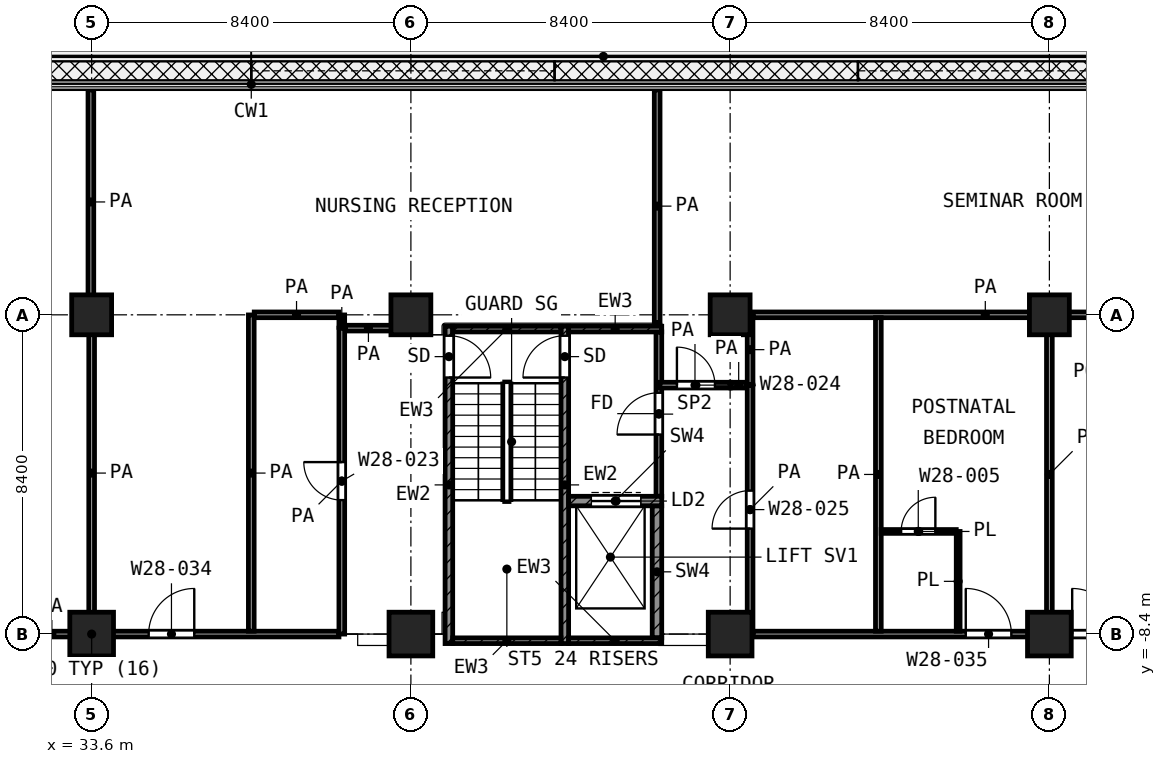
"""IFC4 building model, lengths in metres.
Left out: names, types, materials, properties, quantities, classifications, styles, units other than length and angle.
Written with IfcOpenShell. Run it as: python <this file> out.ifc"""

import sys

from ifc_helpers import new_model, si_unit, direction, frame, frame_2d, origin, origin_2d, place, context, subcontext, project, spatial, rectangle, extrude, element, fill, save


model = new_model("IFC4")
c1 = context("Model", 3, precision=1e-05, world=origin(), true_north=direction((0.0, 1.0)))
c2 = subcontext(c1, "Body", "Model", "MODEL_VIEW")
j1 = project(units=[si_unit("LENGTHUNIT", "METRE"), si_unit("PLANEANGLEUNIT", "RADIAN")], contexts=[c1])
p1 = place(None, origin())
s1 = spatial("IfcSite", under=j1, at=p1, CompositionType="ELEMENT")
p2 = place(p1, origin())
s2 = spatial("IfcBuilding", under=s1, at=p2, CompositionType="ELEMENT")
p3 = place(p2, frame((0.0, 0.0, 145.0)))
s3 = spatial("IfcBuildingStorey", under=s2, at=p3, CompositionType="ELEMENT", Elevation=145.0)
for number, where, z_axis, x_axis in (
    (1, (33.6, 0.0, 0.0), (0.0, 0.0, 1.0), (1.0, 0.0, 0.0)),
    (2, (42.0, 0.0, 0.0), (0.0, 0.0, 1.0), (1.0, 0.0, 0.0)),
    (3, (50.4, 0.0, 0.0), (0.0, 0.0, 1.0), (1.0, 0.0, 0.0)),
    (4, (58.8, 0.0, 0.0), (0.0, 0.0, 1.0), (1.0, 0.0, 0.0)),
):
    element("IfcColumn", number, at=place(p3, frame(where, z_axis=z_axis, x_axis=x_axis)), inside=s3, PredefinedType="COLUMN", context=c2, shape_type="SweptSolid", body=[
        extrude(rectangle(XDim=1.05, YDim=1.05, at=origin_2d()), origin(), (0.0, 0.0, 1.0), 4.2),
    ])
for number, where, z_axis, x_axis in (
    (5, (33.6, -8.4, 0.0), (0.0, 0.0, 1.0), (1.0, 0.0, 0.0)),
    (6, (42.0, -8.4, 0.0), (0.0, 0.0, 1.0), (1.0, 0.0, 0.0)),
    (7, (50.4, -8.4, 0.0), (0.0, 0.0, 1.0), (1.0, 0.0, 0.0)),
    (8, (58.8, -8.4, 0.0), (0.0, 0.0, 1.0), (1.0, 0.0, 0.0)),
):
    element("IfcColumn", number, at=place(p3, frame(where, z_axis=z_axis, x_axis=x_axis)), inside=s3, PredefinedType="COLUMN", context=c2, shape_type="SweptSolid", body=[
        extrude(rectangle(XDim=1.15, YDim=1.15, at=origin_2d()), origin(), (0.0, 0.0, 1.0), 4.2),
    ])
p4 = place(p3, frame((43.0, -8.65, 0.0), z_axis=(0.0, 0.0, 1.0), x_axis=(0.0, 1.0, 0.0)))
e9 = element("IfcWall", 9, at=p4, inside=s3, PredefinedType="SHEAR", context=c2, shape_type="SweptSolid", body=[
    extrude(rectangle(XDim=8.35, YDim=0.2, at=frame_2d((4.175, 0.0))), origin(), (0.0, 0.0, 1.0), 3.6),
])
p5 = place(p4, frame((7.0, 0.0, 0.0)))
e10 = element("IfcOpeningElement", 10, at=p5, cuts=e9, PredefinedType="OPENING", context=c2, shape_type="SweptSolid", body=[
    extrude(rectangle(XDim=1.1, YDim=2.1, at=frame_2d((0.55, 1.05))), frame((0.0, 0.11, 0.0), z_axis=(0.0, -1.0, 0.0), x_axis=(1.0, 0.0, 0.0)), (0.0, 0.0, 1.0), 0.22),
])
p6 = place(p3, frame((46.05, -8.65, 0.0), z_axis=(0.0, 0.0, 1.0), x_axis=(0.0, 1.0, 0.0)))
e11 = element("IfcWall", 11, at=p6, inside=s3, PredefinedType="SHEAR", context=c2, shape_type="SweptSolid", body=[
    extrude(rectangle(XDim=8.35, YDim=0.2, at=frame_2d((4.175, 0.0))), origin(), (0.0, 0.0, 1.0), 3.6),
])
p7 = place(p6, frame((7.0, 0.0, 0.0)))
e12 = element("IfcOpeningElement", 12, at=p7, cuts=e11, PredefinedType="OPENING", context=c2, shape_type="SweptSolid", body=[
    extrude(rectangle(XDim=1.1, YDim=2.1, at=frame_2d((0.55, 1.05))), frame((0.0, 0.11, 0.0), z_axis=(0.0, -1.0, 0.0), x_axis=(1.0, 0.0, 0.0)), (0.0, 0.0, 1.0), 0.22),
])
p8 = place(p3, frame((43.1, -0.375, 0.0), z_axis=(0.0, 0.0, 1.0), x_axis=(1.0, 0.0, 0.0)))
e13 = element("IfcWall", 13, at=p8, inside=s3, PredefinedType="SHEAR", context=c2, shape_type="SweptSolid", body=[
    extrude(rectangle(XDim=2.85, YDim=0.15, at=frame_2d((1.425, 0.0))), origin(), (0.0, 0.0, 1.0), 3.6),
])
p9 = place(p3, frame((46.15, -0.375, 0.0), z_axis=(0.0, 0.0, 1.0), x_axis=(1.0, 0.0, 0.0)))
e14 = element("IfcWall", 14, at=p9, inside=s3, PredefinedType="SHEAR", context=c2, shape_type="SweptSolid", body=[
    extrude(rectangle(XDim=2.45, YDim=0.15, at=frame_2d((1.225, 0.0))), origin(), (0.0, 0.0, 1.0), 3.6),
])
p10 = place(p3, frame((43.1, -8.575, 0.0), z_axis=(0.0, 0.0, 1.0), x_axis=(1.0, 0.0, 0.0)))
e15 = element("IfcWall", 15, at=p10, inside=s3, PredefinedType="SHEAR", context=c2, shape_type="SweptSolid", body=[
    extrude(rectangle(XDim=2.85, YDim=0.15, at=frame_2d((1.425, 0.0))), origin(), (0.0, 0.0, 1.0), 3.6),
])
p11 = place(p3, frame((46.15, -8.575, 0.0), z_axis=(0.0, 0.0, 1.0), x_axis=(1.0, 0.0, 0.0)))
e16 = element("IfcWall", 16, at=p11, inside=s3, PredefinedType="SHEAR", context=c2, shape_type="SweptSolid", body=[
    extrude(rectangle(XDim=2.45, YDim=0.15, at=frame_2d((1.225, 0.0))), origin(), (0.0, 0.0, 1.0), 3.6),
])
p12 = place(p3, frame((46.15, -4.9, 0.0), z_axis=(0.0, 0.0, 1.0), x_axis=(1.0, 0.0, 0.0)))
e17 = element("IfcWall", 17, at=p12, inside=s3, PredefinedType="SHEAR", context=c2, shape_type="SweptSolid", body=[
    extrude(rectangle(XDim=2.45, YDim=0.25, at=frame_2d((1.225, 0.0))), origin(), (0.0, 0.0, 1.0), 3.6),
])
p13 = place(p12, frame((0.6, 0.0, 0.0)))
e18 = element("IfcOpeningElement", 18, at=p13, cuts=e17, PredefinedType="OPENING", context=c2, shape_type="SweptSolid", body=[
    extrude(rectangle(XDim=1.3, YDim=2.1, at=frame_2d((0.65, 1.05))), frame((0.0, 0.135, 0.0), z_axis=(0.0, -1.0, 0.0), x_axis=(1.0, 0.0, 0.0)), (0.0, 0.0, 1.0), 0.27),
])
p14 = place(p3, frame((48.475, -8.5, 0.0), z_axis=(0.0, 0.0, 1.0), x_axis=(0.0, 1.0, 0.0)))
e19 = element("IfcWall", 19, at=p14, inside=s3, PredefinedType="SHEAR", context=c2, shape_type="SweptSolid", body=[
    extrude(rectangle(XDim=3.475, YDim=0.25, at=frame_2d((1.738, 0.0))), origin(), (0.0, 0.0, 1.0), 3.6),
])
p15 = place(p3, frame((48.525, -4.775, 0.0), z_axis=(0.0, 0.0, 1.0), x_axis=(0.0, 1.0, 0.0)))
e20 = element("IfcWall", 20, at=p15, inside=s3, PredefinedType="PARTITIONING", context=c2, shape_type="SweptSolid", body=[
    extrude(rectangle(XDim=4.325, YDim=0.15, at=frame_2d((2.163, 0.0))), origin(), (0.0, 0.0, 1.0), 3.6),
])
p16 = place(p15, frame((1.625, 0.0, 0.0)))
e21 = element("IfcOpeningElement", 21, at=p16, cuts=e20, PredefinedType="OPENING", context=c2, shape_type="SweptSolid", body=[
    extrude(rectangle(XDim=1.1, YDim=2.1, at=frame_2d((0.55, 1.05))), frame((0.0, 0.085, 0.0), z_axis=(0.0, -1.0, 0.0), x_axis=(1.0, 0.0, 0.0)), (0.0, 0.0, 1.0), 0.17),
])
p17 = place(p3, frame((54.375, -5.7, 0.0), z_axis=(0.0, 0.0, 1.0), x_axis=(1.0, 0.0, 0.0)))
e22 = element("IfcWall", 22, at=p17, inside=s3, PredefinedType="PARTITIONING", context=c2, shape_type="SweptSolid", body=[
    extrude(rectangle(XDim=1.975, YDim=0.1, at=frame_2d((0.988, 0.0))), origin(), (0.0, 0.0, 1.0), 3.6),
])
p18 = place(p17, frame((0.525, 0.0, 0.0)))
e23 = element("IfcOpeningElement", 23, at=p18, cuts=e22, PredefinedType="OPENING", context=c2, shape_type="SweptSolid", body=[
    extrude(rectangle(XDim=0.9, YDim=2.1, at=frame_2d((0.45, 1.05))), frame((0.0, 0.06, 0.0), z_axis=(0.0, -1.0, 0.0), x_axis=(1.0, 0.0, 0.0)), (0.0, 0.0, 1.0), 0.12),
])
p19 = place(p3, frame((56.4, -8.325, 0.0), z_axis=(0.0, 0.0, 1.0), x_axis=(0.0, 1.0, 0.0)))
e24 = element("IfcWall", 24, at=p19, inside=s3, PredefinedType="PARTITIONING", context=c2, shape_type="SweptSolid", body=[
    extrude(rectangle(XDim=2.625, YDim=0.1, at=frame_2d((1.312, 0.0))), origin(), (0.0, 0.0, 1.0), 3.6),
])
p20 = place(p3, frame((25.0, -8.4, 0.0), z_axis=(0.0, 0.0, 1.0), x_axis=(1.0, 0.0, 0.0)))
e25 = element("IfcWall", 25, at=p20, inside=s3, PredefinedType="PARTITIONING", context=c2, shape_type="SweptSolid", body=[
    extrude(rectangle(XDim=15.107, YDim=0.15, at=frame_2d((7.553, 0.0))), origin(), (0.0, 0.0, 1.0), 3.6),
])
p21 = place(p20, frame((3.9, 0.0, 0.0)))
e26 = element("IfcOpeningElement", 26, at=p21, cuts=e25, PredefinedType="OPENING", context=c2, shape_type="SweptSolid", body=[
    extrude(rectangle(XDim=1.0, YDim=2.1, at=frame_2d((0.5, 1.05))), frame((0.0, 0.085, 0.0), z_axis=(0.0, -1.0, 0.0), x_axis=(1.0, 0.0, 0.0)), (0.0, 0.0, 1.0), 0.17),
])
p22 = place(p20, frame((10.1, 0.0, 0.0)))
e27 = element("IfcOpeningElement", 27, at=p22, cuts=e25, PredefinedType="OPENING", context=c2, shape_type="SweptSolid", body=[
    extrude(rectangle(XDim=1.2, YDim=2.1, at=frame_2d((0.6, 1.05))), frame((0.0, 0.085, 0.0), z_axis=(0.0, -1.0, 0.0), x_axis=(1.0, 0.0, 0.0)), (0.0, 0.0, 1.0), 0.17),
])
p23 = place(p3, frame((51.0, -8.4, 0.0), z_axis=(0.0, 0.0, 1.0), x_axis=(1.0, 0.0, 0.0)))
e28 = element("IfcWall", 28, at=p23, inside=s3, PredefinedType="PARTITIONING", context=c2, shape_type="SweptSolid", body=[
    extrude(rectangle(XDim=24.52, YDim=0.15, at=frame_2d((12.26, 0.0))), origin(), (0.0, 0.0, 1.0), 3.6),
])
p24 = place(p23, frame((5.6, 0.0, 0.0)))
e29 = element("IfcOpeningElement", 29, at=p24, cuts=e28, PredefinedType="OPENING", context=c2, shape_type="SweptSolid", body=[
    extrude(rectangle(XDim=1.2, YDim=2.1, at=frame_2d((0.6, 1.05))), frame((0.0, 0.085, 0.0), z_axis=(0.0, -1.0, 0.0), x_axis=(1.0, 0.0, 0.0)), (0.0, 0.0, 1.0), 0.17),
])
p25 = place(p23, frame((8.4, 0.0, 0.0)))
e30 = element("IfcOpeningElement", 30, at=p25, cuts=e28, PredefinedType="OPENING", context=c2, shape_type="SweptSolid", body=[
    extrude(rectangle(XDim=1.2, YDim=2.1, at=frame_2d((0.6, 1.05))), frame((0.0, 0.085, 0.0), z_axis=(0.0, -1.0, 0.0), x_axis=(1.0, 0.0, 0.0)), (0.0, 0.0, 1.0), 0.17),
])
p26 = place(p23, frame((14.6, 0.0, 0.0)))
e31 = element("IfcOpeningElement", 31, at=p26, cuts=e28, PredefinedType="OPENING", context=c2, shape_type="SweptSolid", body=[
    extrude(rectangle(XDim=0.9, YDim=2.1, at=frame_2d((0.45, 1.05))), frame((0.0, 0.085, 0.0), z_axis=(0.0, -1.0, 0.0), x_axis=(1.0, 0.0, 0.0)), (0.0, 0.0, 1.0), 0.17),
])
p27 = place(p23, frame((19.65, 0.0, 0.0)))
e32 = element("IfcOpeningElement", 32, at=p27, cuts=e28, PredefinedType="OPENING", context=c2, shape_type="SweptSolid", body=[
    extrude(rectangle(XDim=1.5, YDim=2.1, at=frame_2d((0.75, 1.05))), frame((0.0, 0.085, 0.0), z_axis=(0.0, -1.0, 0.0), x_axis=(1.0, 0.0, 0.0)), (0.0, 0.0, 1.0), 0.17),
])
p28 = place(p3, frame((48.55, -1.85, 0.0), z_axis=(0.0, 0.0, 1.0), x_axis=(1.0, 0.0, 0.0)))
e33 = element("IfcWall", 33, at=p28, inside=s3, PredefinedType="PARTITIONING", context=c2, shape_type="SweptSolid", body=[
    extrude(rectangle(XDim=1.85, YDim=0.15, at=frame_2d((0.925, 0.0))), origin(), (0.0, 0.0, 1.0), 3.6),
])
p29 = place(p28, frame((0.45, 0.0, 0.0)))
e34 = element("IfcOpeningElement", 34, at=p29, cuts=e33, PredefinedType="OPENING", context=c2, shape_type="SweptSolid", body=[
    extrude(rectangle(XDim=1.0, YDim=2.1, at=frame_2d((0.5, 1.05))), frame((0.0, 0.085, 0.0), z_axis=(0.0, -1.0, 0.0), x_axis=(1.0, 0.0, 0.0)), (0.0, 0.0, 1.0), 0.17),
])
p30 = place(p3, frame((50.42, -1.85, 0.0), z_axis=(0.0, 0.0, 1.0), x_axis=(1.0, 0.0, 0.0)))
e35 = element("IfcWall", 35, at=p30, inside=s3, PredefinedType="PARTITIONING", context=c2, shape_type="SweptSolid", body=[
    extrude(rectangle(XDim=0.41, YDim=0.15, at=frame_2d((0.205, 0.0))), origin(), (0.0, 0.0, 1.0), 3.6),
])
p31 = place(p3, frame((40.277, -0.35, 0.0), z_axis=(0.0, 0.0, 1.0), x_axis=(1.0, 0.0, 0.0)))
e36 = element("IfcWall", 36, at=p31, inside=s3, PredefinedType="PARTITIONING", context=c2, shape_type="SweptSolid", body=[
    extrude(rectangle(XDim=1.211, YDim=0.15, at=frame_2d((0.605, 0.0))), origin(), (0.0, 0.0, 1.0), 3.6),
])
p32 = place(p3, frame((37.878, 0.0, 0.0), z_axis=(0.0, 0.0, 1.0), x_axis=(1.0, 0.0, 0.0)))
e37 = element("IfcWall", 37, at=p32, inside=s3, PredefinedType="PARTITIONING", context=c2, shape_type="SweptSolid", body=[
    extrude(rectangle(XDim=2.226, YDim=0.15, at=frame_2d((1.113, 0.0))), origin(), (0.0, 0.0, 1.0), 3.6),
])
p33 = place(p3, frame((51.003, 0.0, 0.0), z_axis=(0.0, 0.0, 1.0), x_axis=(1.0, 0.0, 0.0)))
e38 = element("IfcWall", 38, at=p33, inside=s3, PredefinedType="PARTITIONING", context=c2, shape_type="SweptSolid", body=[
    extrude(rectangle(XDim=12.222, YDim=0.15, at=frame_2d((6.111, 0.0))), origin(), (0.0, 0.0, 1.0), 3.6),
])
p34 = place(p3, frame((33.58, 0.02, 0.0), z_axis=(0.0, 0.0, 1.0), x_axis=(0.0, 1.0, 0.0)))
e39 = element("IfcWall", 39, at=p34, inside=s3, PredefinedType="PARTITIONING", context=c2, shape_type="SweptSolid", body=[
    extrude(rectangle(XDim=5.9, YDim=0.15, at=frame_2d((2.95, 0.0))), origin(), (0.0, 0.0, 1.0), 3.6),
])
for number, where, z_axis, x_axis in (
    (40, (33.6, -8.325, 0.0), (0.0, 0.0, 1.0), (0.0, 1.0, 0.0)),
    (41, (37.8, -8.325, 0.0), (0.0, 0.0, 1.0), (0.0, 1.0, 0.0)),
):
    element("IfcWall", number, at=place(p3, frame(where, z_axis=z_axis, x_axis=x_axis)), inside=s3, PredefinedType="PARTITIONING", context=c2, shape_type="SweptSolid", body=[
        extrude(rectangle(XDim=8.322, YDim=0.15, at=frame_2d((4.161, 0.0))), origin(), (0.0, 0.0, 1.0), 3.6),
    ])
p35 = place(p3, frame((40.182, -8.4, 0.0), z_axis=(0.0, 0.0, 1.0), x_axis=(0.0, 1.0, 0.0)))
e42 = element("IfcWall", 42, at=p35, inside=s3, PredefinedType="PARTITIONING", context=c2, shape_type="SweptSolid", body=[
    extrude(rectangle(XDim=8.05, YDim=0.15, at=frame_2d((4.025, 0.0))), origin(), (0.0, 0.0, 1.0), 3.6),
])
p36 = place(p35, frame((3.525, 0.0, 0.0)))
e43 = element("IfcOpeningElement", 43, at=p36, cuts=e42, PredefinedType="OPENING", context=c2, shape_type="SweptSolid", body=[
    extrude(rectangle(XDim=1.0, YDim=2.1, at=frame_2d((0.5, 1.05))), frame((0.0, 0.085, 0.0), z_axis=(0.0, -1.0, 0.0), x_axis=(1.0, 0.0, 0.0)), (0.0, 0.0, 1.0), 0.17),
])
p37 = place(p3, frame((40.182, -0.33, 0.0), z_axis=(0.0, 0.0, 1.0), x_axis=(0.0, 1.0, 0.0)))
e44 = element("IfcWall", 44, at=p37, inside=s3, PredefinedType="PARTITIONING", context=c2, shape_type="SweptSolid", body=[
    extrude(rectangle(XDim=0.327, YDim=0.15, at=frame_2d((0.164, 0.0))), origin(), (0.0, 0.0, 1.0), 3.6),
])
p38 = place(p3, frame((48.48, -0.2, 0.0), z_axis=(0.0, 0.0, 1.0), x_axis=(0.0, 1.0, 0.0)))
e45 = element("IfcWall", 45, at=p38, inside=s3, PredefinedType="PARTITIONING", context=c2, shape_type="SweptSolid", body=[
    extrude(rectangle(XDim=6.12, YDim=0.15, at=frame_2d((3.06, 0.0))), origin(), (0.0, 0.0, 1.0), 3.6),
])
p39 = place(p3, frame((50.925, -8.4, 0.0), z_axis=(0.0, 0.0, 1.0), x_axis=(0.0, 1.0, 0.0)))
e46 = element("IfcWall", 46, at=p39, inside=s3, PredefinedType="PARTITIONING", context=c2, shape_type="SweptSolid", body=[
    extrude(rectangle(XDim=6.55, YDim=0.15, at=frame_2d((3.275, 0.0))), origin(), (0.0, 0.0, 1.0), 3.6),
])
p40 = place(p39, frame((2.775, 0.0, 0.0)))
e47 = element("IfcOpeningElement", 47, at=p40, cuts=e46, PredefinedType="OPENING", context=c2, shape_type="SweptSolid", body=[
    extrude(rectangle(XDim=1.0, YDim=2.1, at=frame_2d((0.5, 1.05))), frame((0.0, 0.085, 0.0), z_axis=(0.0, -1.0, 0.0), x_axis=(1.0, 0.0, 0.0)), (0.0, 0.0, 1.0), 0.17),
])
p41 = place(p3, frame((50.925, -1.83, 0.0), z_axis=(0.0, 0.0, 1.0), x_axis=(0.0, 1.0, 0.0)))
e48 = element("IfcWall", 48, at=p41, inside=s3, PredefinedType="PARTITIONING", context=c2, shape_type="SweptSolid", body=[
    extrude(rectangle(XDim=1.827, YDim=0.15, at=frame_2d((0.914, 0.0))), origin(), (0.0, 0.0, 1.0), 3.6),
])
for number, where, z_axis, x_axis in (
    (49, (54.3, -8.325, 0.0), (0.0, 0.0, 1.0), (0.0, 1.0, 0.0)),
    (50, (58.8, -8.325, 0.0), (0.0, 0.0, 1.0), (0.0, 1.0, 0.0)),
):
    element("IfcWall", number, at=place(p3, frame(where, z_axis=z_axis, x_axis=x_axis)), inside=s3, PredefinedType="PARTITIONING", context=c2, shape_type="SweptSolid", body=[
        extrude(rectangle(XDim=8.25, YDim=0.15, at=frame_2d((4.125, 0.0))), origin(), (0.0, 0.0, 1.0), 3.6),
    ])
p42 = place(p5, frame((1.1, 0.0, 0.0), z_axis=(0.0, 0.0, 1.0), x_axis=(-1.0, 0.0, 0.0)))
e51 = element("IfcDoor", 51, at=p42, inside=s3, OperationType="SINGLE_SWING_LEFT", PredefinedType="DOOR", context=c2, shape_type="SweptSolid", body=[
    extrude(rectangle(XDim=1.1, YDim=2.1, at=frame_2d((0.55, 1.05))), frame((0.0, 0.025, 0.0), z_axis=(0.0, -1.0, 0.0), x_axis=(1.0, 0.0, 0.0)), (0.0, 0.0, 1.0), 0.05),
])
fill(e10, e51)
p43 = place(p7, origin())
e52 = element("IfcDoor", 52, at=p43, inside=s3, OperationType="SINGLE_SWING_LEFT", PredefinedType="DOOR", context=c2, shape_type="SweptSolid", body=[
    extrude(rectangle(XDim=1.1, YDim=2.1, at=frame_2d((0.55, 1.05))), frame((0.0, 0.025, 0.0), z_axis=(0.0, -1.0, 0.0), x_axis=(1.0, 0.0, 0.0)), (0.0, 0.0, 1.0), 0.05),
])
fill(e12, e52)
p44 = place(p13, origin())
e53 = element("IfcDoor", 53, at=p44, inside=s3, OperationType="DOUBLE_DOOR_SLIDING", PredefinedType="DOOR", context=c2, shape_type="SweptSolid", body=[
    extrude(rectangle(XDim=1.3, YDim=2.1, at=frame_2d((0.65, 1.05))), frame((0.0, 0.025, 0.0), z_axis=(0.0, -1.0, 0.0), x_axis=(1.0, 0.0, 0.0)), (0.0, 0.0, 1.0), 0.05),
])
fill(e18, e53)
p45 = place(p16, origin())
e54 = element("IfcDoor", 54, at=p45, inside=s3, OperationType="SINGLE_SWING_LEFT", PredefinedType="DOOR", context=c2, shape_type="SweptSolid", body=[
    extrude(rectangle(XDim=1.1, YDim=2.1, at=frame_2d((0.55, 1.05))), frame((0.0, 0.025, 0.0), z_axis=(0.0, -1.0, 0.0), x_axis=(1.0, 0.0, 0.0)), (0.0, 0.0, 1.0), 0.05),
])
fill(e21, e54)
p46 = place(p22, origin())
e55 = element("IfcDoor", 55, at=p46, inside=s3, OperationType="SINGLE_SWING_RIGHT", PredefinedType="DOOR", context=c2, shape_type="SweptSolid", body=[
    extrude(rectangle(XDim=1.2, YDim=2.1, at=frame_2d((0.6, 1.05))), frame((0.0, 0.025, 0.0), z_axis=(0.0, -1.0, 0.0), x_axis=(1.0, 0.0, 0.0)), (0.0, 0.0, 1.0), 0.05),
])
fill(e27, e55)
p47 = place(p36, origin())
e56 = element("IfcDoor", 56, at=p47, inside=s3, OperationType="SINGLE_SWING_RIGHT", PredefinedType="DOOR", context=c2, shape_type="SweptSolid", body=[
    extrude(rectangle(XDim=1.0, YDim=2.1, at=frame_2d((0.5, 1.05))), frame((0.0, 0.025, 0.0), z_axis=(0.0, -1.0, 0.0), x_axis=(1.0, 0.0, 0.0)), (0.0, 0.0, 1.0), 0.05),
])
fill(e43, e56)
p48 = place(p29, origin())
e57 = element("IfcDoor", 57, at=p48, inside=s3, OperationType="SINGLE_SWING_LEFT", PredefinedType="DOOR", context=c2, shape_type="SweptSolid", body=[
    extrude(rectangle(XDim=1.0, YDim=2.1, at=frame_2d((0.5, 1.05))), frame((0.0, 0.025, 0.0), z_axis=(0.0, -1.0, 0.0), x_axis=(1.0, 0.0, 0.0)), (0.0, 0.0, 1.0), 0.05),
])
fill(e34, e57)
p49 = place(p40, origin())
e58 = element("IfcDoor", 58, at=p49, inside=s3, OperationType="SINGLE_SWING_LEFT", PredefinedType="DOOR", context=c2, shape_type="SweptSolid", body=[
    extrude(rectangle(XDim=1.0, YDim=2.1, at=frame_2d((0.5, 1.05))), frame((0.0, 0.025, 0.0), z_axis=(0.0, -1.0, 0.0), x_axis=(1.0, 0.0, 0.0)), (0.0, 0.0, 1.0), 0.05),
])
fill(e47, e58)
p50 = place(p24, origin())
e59 = element("IfcDoor", 59, at=p50, inside=s3, OperationType="SINGLE_SWING_LEFT", PredefinedType="DOOR", context=c2, shape_type="SweptSolid", body=[
    extrude(rectangle(XDim=1.2, YDim=2.1, at=frame_2d((0.6, 1.05))), frame((0.0, 0.025, 0.0), z_axis=(0.0, -1.0, 0.0), x_axis=(1.0, 0.0, 0.0)), (0.0, 0.0, 1.0), 0.05),
])
fill(e29, e59)
p51 = place(p18, origin())
e60 = element("IfcDoor", 60, at=p51, inside=s3, OperationType="SINGLE_SWING_RIGHT", PredefinedType="DOOR", context=c2, shape_type="SweptSolid", body=[
    extrude(rectangle(XDim=0.9, YDim=2.1, at=frame_2d((0.45, 1.05))), frame((0.0, 0.025, 0.0), z_axis=(0.0, -1.0, 0.0), x_axis=(1.0, 0.0, 0.0)), (0.0, 0.0, 1.0), 0.05),
])
fill(e23, e60)
p52 = place(p25, origin())
e61 = element("IfcDoor", 61, at=p52, inside=s3, OperationType="SINGLE_SWING_LEFT", PredefinedType="DOOR", context=c2, shape_type="SweptSolid", body=[
    extrude(rectangle(XDim=1.2, YDim=2.1, at=frame_2d((0.6, 1.05))), frame((0.0, 0.025, 0.0), z_axis=(0.0, -1.0, 0.0), x_axis=(1.0, 0.0, 0.0)), (0.0, 0.0, 1.0), 0.05),
])
fill(e30, e61)
save(model, sys.argv[1])
